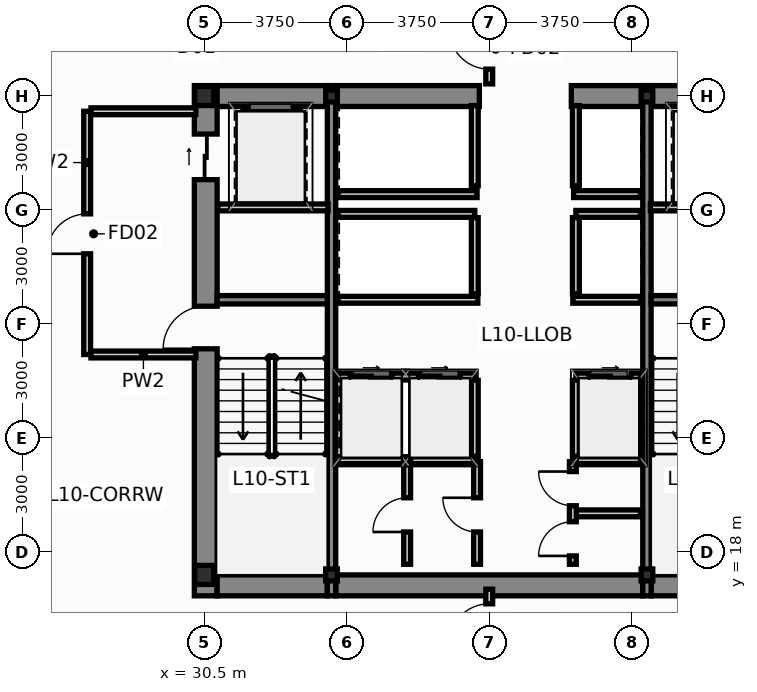
"""IFC4 building model, lengths in metres.
Left out: names, types, materials, properties, quantities, classifications, styles, units other than length and angle.
Written with IfcOpenShell. Run it as: python <this file> out.ifc"""

import sys

from ifc_helpers import new_model, si_unit, direction, frame, frame_2d, origin, origin_2d, place, context, subcontext, project, spatial, rectangle, i_section, extrude, source, transform, mapped, element, fill, save


model = new_model("IFC4")
c1 = context("Model", 3, precision=1e-05, world=origin(), true_north=direction((0.0, 1.0)))
c2 = subcontext(c1, "Body", "Model", "MODEL_VIEW")
j1 = project(units=[si_unit("LENGTHUNIT", "METRE"), si_unit("PLANEANGLEUNIT", "RADIAN")], contexts=[c1])
p1 = place(None, origin())
s1 = spatial("IfcSite", under=j1, at=p1, CompositionType="ELEMENT")
p2 = place(p1, origin())
s2 = spatial("IfcBuilding", under=s1, at=p2, CompositionType="ELEMENT")
p3 = place(p2, frame((0.0, 0.0, 42.2)))
s3 = spatial("IfcBuildingStorey", under=s2, at=p3, CompositionType="ELEMENT", Elevation=42.2)
m1 = source(origin(), c2, "Body", "SweptSolid", [
    extrude(i_section(OverallWidth=0.5, OverallDepth=0.5, WebThickness=0.028, FlangeThickness=0.04, at=origin_2d()), origin(), (0.0, 0.0, 1.0), 3.65),
])
for number, where, z_axis, x_axis in (
    (1, (30.5, 17.4, 0.0), (0.0, 0.0, 1.0), (1.0, 0.0, 0.0)),
    (2, (30.5, 30.0, 0.0), (0.0, 0.0, 1.0), (1.0, 0.0, 0.0)),
):
    element("IfcColumn", number, at=place(p3, frame(where, z_axis=z_axis, x_axis=x_axis)), inside=s3, PredefinedType="COLUMN", context=c2, shape_type="MappedRepresentation", body=[
        mapped(m1, transform((0.0, 0.0, 0.0), scale=1.0)),
    ])
m2 = source(origin(), c2, "Body", "SweptSolid", [
    extrude(i_section(OverallWidth=0.307, OverallDepth=0.315, WebThickness=0.012, FlangeThickness=0.019, at=origin_2d()), origin(), (0.0, 0.0, 1.0), 3.65),
])
for number, where, z_axis, x_axis in (
    (3, (33.85, 17.4, 0.0), (0.0, 0.0, 1.0), (1.0, 0.0, 0.0)),
    (4, (42.15, 17.4, 0.0), (0.0, 0.0, 1.0), (1.0, 0.0, 0.0)),
    (5, (33.85, 30.0, 0.0), (0.0, 0.0, 1.0), (1.0, 0.0, 0.0)),
    (6, (42.15, 30.0, 0.0), (0.0, 0.0, 1.0), (1.0, 0.0, 0.0)),
):
    element("IfcColumn", number, at=place(p3, frame(where, z_axis=z_axis, x_axis=x_axis)), inside=s3, PredefinedType="COLUMN", context=c2, shape_type="MappedRepresentation", body=[
        mapped(m2, transform((0.0, 0.0, 0.0), scale=1.0)),
    ])
p4 = place(p3, frame((30.54, 16.85, 0.0), z_axis=(0.0, 0.0, 1.0), x_axis=(0.0, 1.0, 0.0)))
e7 = element("IfcWall", 7, at=p4, inside=s3, PredefinedType="SHEAR", context=c2, shape_type="SweptSolid", body=[
    extrude(rectangle(XDim=13.425, YDim=0.6, at=frame_2d((6.712, 0.0))), origin(), (0.0, 0.0, 1.0), 3.65),
])
p5 = place(p4, frame((6.5, 0.0, 0.0)))
e8 = element("IfcOpeningElement", 8, at=p5, cuts=e7, PredefinedType="OPENING", context=c2, shape_type="SweptSolid", body=[
    extrude(rectangle(XDim=1.12, YDim=2.15, at=frame_2d((0.56, 1.075))), frame((0.0, 0.312, 0.0), z_axis=(0.0, -1.0, 0.0), x_axis=(1.0, 0.0, 0.0)), (0.0, 0.0, 1.0), 0.624),
])
p6 = place(p4, frame((10.95, 0.0, 0.0)))
e9 = element("IfcOpeningElement", 9, at=p6, cuts=e7, PredefinedType="OPENING", context=c2, shape_type="SweptSolid", body=[
    extrude(rectangle(XDim=1.2, YDim=2.2, at=frame_2d((0.6, 1.1))), frame((0.0, 0.312, 0.0), z_axis=(0.0, -1.0, 0.0), x_axis=(1.0, 0.0, 0.0)), (0.0, 0.0, 1.0), 0.624),
])
p7 = place(p3, frame((30.84, 17.125, 0.0), z_axis=(0.0, 0.0, 1.0), x_axis=(1.0, 0.0, 0.0)))
e10 = element("IfcWall", 10, at=p7, inside=s3, PredefinedType="SHEAR", context=c2, shape_type="SweptSolid", body=[
    extrude(rectangle(XDim=2.9, YDim=0.55, at=frame_2d((1.45, 0.0))), origin(), (0.0, 0.0, 1.0), 3.65),
])
p8 = place(p3, frame((33.96, 17.125, 0.0), z_axis=(0.0, 0.0, 1.0), x_axis=(1.0, 0.0, 0.0)))
e11 = element("IfcWall", 11, at=p8, inside=s3, PredefinedType="SHEAR", context=c2, shape_type="SweptSolid", body=[
    extrude(rectangle(XDim=8.08, YDim=0.55, at=frame_2d((4.04, 0.0))), origin(), (0.0, 0.0, 1.0), 3.65),
])
for number, where, z_axis, x_axis in (
    (12, (42.26, 17.125, 0.0), (0.0, 0.0, 1.0), (1.0, 0.0, 0.0)),
    (13, (30.84, 30.0, 0.0), (0.0, 0.0, 1.0), (1.0, 0.0, 0.0)),
):
    element("IfcWall", number, at=place(p3, frame(where, z_axis=z_axis, x_axis=x_axis)), inside=s3, PredefinedType="SHEAR", context=c2, shape_type="SweptSolid", body=[
        extrude(rectangle(XDim=2.9, YDim=0.55, at=frame_2d((1.45, 0.0))), origin(), (0.0, 0.0, 1.0), 3.65),
    ])
p9 = place(p3, frame((33.96, 30.0, 0.0), z_axis=(0.0, 0.0, 1.0), x_axis=(1.0, 0.0, 0.0)))
e14 = element("IfcWall", 14, at=p9, inside=s3, PredefinedType="SHEAR", context=c2, shape_type="SweptSolid", body=[
    extrude(rectangle(XDim=3.78, YDim=0.55, at=frame_2d((1.89, 0.0))), origin(), (0.0, 0.0, 1.0), 3.65),
])
p10 = place(p3, frame((40.16, 30.0, 0.0), z_axis=(0.0, 0.0, 1.0), x_axis=(1.0, 0.0, 0.0)))
e15 = element("IfcWall", 15, at=p10, inside=s3, PredefinedType="SHEAR", context=c2, shape_type="SweptSolid", body=[
    extrude(rectangle(XDim=1.88, YDim=0.55, at=frame_2d((0.94, 0.0))), origin(), (0.0, 0.0, 1.0), 3.65),
])
p11 = place(p3, frame((42.26, 30.0, 0.0), z_axis=(0.0, 0.0, 1.0), x_axis=(1.0, 0.0, 0.0)))
e16 = element("IfcWall", 16, at=p11, inside=s3, PredefinedType="SHEAR", context=c2, shape_type="SweptSolid", body=[
    extrude(rectangle(XDim=2.9, YDim=0.55, at=frame_2d((1.45, 0.0))), origin(), (0.0, 0.0, 1.0), 3.65),
])
for number, where, z_axis, x_axis in (
    (17, (33.85, 16.85, 0.0), (0.0, 0.0, 1.0), (0.0, 1.0, 0.0)),
    (18, (42.15, 16.85, 0.0), (0.0, 0.0, 1.0), (0.0, 1.0, 0.0)),
):
    element("IfcWall", number, at=place(p3, frame(where, z_axis=z_axis, x_axis=x_axis)), inside=s3, PredefinedType="SHEAR", context=c2, shape_type="SweptSolid", body=[
        extrude(rectangle(XDim=13.425, YDim=0.22, at=frame_2d((6.712, 0.0))), origin(), (0.0, 0.0, 1.0), 3.65),
    ])
for number, where, z_axis, x_axis in (
    (19, (30.84, 24.64, 0.0), (0.0, 0.0, 1.0), (1.0, 0.0, 0.0)),
    (20, (42.26, 24.64, 0.0), (0.0, 0.0, 1.0), (1.0, 0.0, 0.0)),
):
    element("IfcWall", number, at=place(p3, frame(where, z_axis=z_axis, x_axis=x_axis)), inside=s3, PredefinedType="SHEAR", context=c2, shape_type="SweptSolid", body=[
        extrude(rectangle(XDim=2.9, YDim=0.22, at=frame_2d((1.45, 0.0))), origin(), (0.0, 0.0, 1.0), 3.65),
    ])
p12 = place(p3, frame((34.02, 22.62, 0.0), z_axis=(0.0, 0.0, 1.0), x_axis=(1.0, 0.0, 0.0)))
e21 = element("IfcWall", 21, at=p12, inside=s3, PredefinedType="PARTITIONING", context=c2, shape_type="SweptSolid", body=[
    extrude(rectangle(XDim=3.6, YDim=0.18, at=frame_2d((1.8, 0.0))), origin(), (0.0, 0.0, 1.0), 3.4),
])
p13 = place(p12, frame((0.32, 0.0, 0.0)))
e22 = element("IfcOpeningElement", 22, at=p13, cuts=e21, PredefinedType="OPENING", context=c2, shape_type="SweptSolid", body=[
    extrude(rectangle(XDim=1.1, YDim=2.2, at=frame_2d((0.55, 1.1))), frame((0.0, 0.102, 0.0), z_axis=(0.0, -1.0, 0.0), x_axis=(1.0, 0.0, 0.0)), (0.0, 0.0, 1.0), 0.204),
])
p14 = place(p12, frame((2.12, 0.0, 0.0)))
e23 = element("IfcOpeningElement", 23, at=p14, cuts=e21, PredefinedType="OPENING", context=c2, shape_type="SweptSolid", body=[
    extrude(rectangle(XDim=1.1, YDim=2.2, at=frame_2d((0.55, 1.1))), frame((0.0, 0.102, 0.0), z_axis=(0.0, -1.0, 0.0), x_axis=(1.0, 0.0, 0.0)), (0.0, 0.0, 1.0), 0.204),
])
p15 = place(p3, frame((40.28, 22.62, 0.0), z_axis=(0.0, 0.0, 1.0), x_axis=(1.0, 0.0, 0.0)))
e24 = element("IfcWall", 24, at=p15, inside=s3, PredefinedType="PARTITIONING", context=c2, shape_type="SweptSolid", body=[
    extrude(rectangle(XDim=1.7, YDim=0.18, at=frame_2d((0.85, 0.0))), origin(), (0.0, 0.0, 1.0), 3.4),
])
p16 = place(p15, frame((0.35, 0.0, 0.0)))
e25 = element("IfcOpeningElement", 25, at=p16, cuts=e24, PredefinedType="OPENING", context=c2, shape_type="SweptSolid", body=[
    extrude(rectangle(XDim=1.1, YDim=2.2, at=frame_2d((0.55, 1.1))), frame((0.0, 0.102, 0.0), z_axis=(0.0, -1.0, 0.0), x_axis=(1.0, 0.0, 0.0)), (0.0, 0.0, 1.0), 0.204),
])
for number, where, z_axis, x_axis in (
    (26, (37.62, 20.52, 0.0), (0.0, 0.0, 1.0), (0.0, 1.0, 0.0)),
    (27, (40.28, 20.52, 0.0), (0.0, 0.0, 1.0), (0.0, 1.0, 0.0)),
):
    element("IfcWall", number, at=place(p3, frame(where, z_axis=z_axis, x_axis=x_axis)), inside=s3, PredefinedType="PARTITIONING", context=c2, shape_type="SweptSolid", body=[
        extrude(rectangle(XDim=2.0, YDim=0.18, at=frame_2d((1.0, 0.0))), origin(), (0.0, 0.0, 1.0), 3.4),
    ])
p17 = place(p3, frame((34.02, 26.9, 0.0), z_axis=(0.0, 0.0, 1.0), x_axis=(1.0, 0.0, 0.0)))
e28 = element("IfcWall", 28, at=p17, inside=s3, PredefinedType="PARTITIONING", context=c2, shape_type="SweptSolid", body=[
    extrude(rectangle(XDim=3.6, YDim=0.18, at=frame_2d((1.8, 0.0))), origin(), (0.0, 0.0, 1.0), 3.4),
])
p18 = place(p3, frame((40.28, 26.9, 0.0), z_axis=(0.0, 0.0, 1.0), x_axis=(1.0, 0.0, 0.0)))
e29 = element("IfcWall", 29, at=p18, inside=s3, PredefinedType="PARTITIONING", context=c2, shape_type="SweptSolid", body=[
    extrude(rectangle(XDim=1.7, YDim=0.18, at=frame_2d((0.85, 0.0))), origin(), (0.0, 0.0, 1.0), 3.4),
])
for number, where, z_axis, x_axis in (
    (30, (37.62, 24.8, 0.0), (0.0, 0.0, 1.0), (0.0, 1.0, 0.0)),
    (31, (40.28, 24.8, 0.0), (0.0, 0.0, 1.0), (0.0, 1.0, 0.0)),
):
    element("IfcWall", number, at=place(p3, frame(where, z_axis=z_axis, x_axis=x_axis)), inside=s3, PredefinedType="PARTITIONING", context=c2, shape_type="SweptSolid", body=[
        extrude(rectangle(XDim=2.0, YDim=0.18, at=frame_2d((1.0, 0.0))), origin(), (0.0, 0.0, 1.0), 3.4),
    ])
p19 = place(p3, frame((34.02, 24.64, 0.0), z_axis=(0.0, 0.0, 1.0), x_axis=(1.0, 0.0, 0.0)))
e32 = element("IfcWall", 32, at=p19, inside=s3, PredefinedType="PARTITIONING", context=c2, shape_type="SweptSolid", body=[
    extrude(rectangle(XDim=3.68, YDim=0.18, at=frame_2d((1.84, 0.0))), origin(), (0.0, 0.0, 1.0), 3.4),
])
p20 = place(p3, frame((40.2, 24.64, 0.0), z_axis=(0.0, 0.0, 1.0), x_axis=(1.0, 0.0, 0.0)))
e33 = element("IfcWall", 33, at=p20, inside=s3, PredefinedType="PARTITIONING", context=c2, shape_type="SweptSolid", body=[
    extrude(rectangle(XDim=1.78, YDim=0.18, at=frame_2d((0.89, 0.0))), origin(), (0.0, 0.0, 1.0), 3.4),
])
p21 = place(p3, frame((34.02, 27.42, 0.0), z_axis=(0.0, 0.0, 1.0), x_axis=(1.0, 0.0, 0.0)))
e34 = element("IfcWall", 34, at=p21, inside=s3, PredefinedType="PARTITIONING", context=c2, shape_type="SweptSolid", body=[
    extrude(rectangle(XDim=3.66, YDim=0.18, at=frame_2d((1.83, 0.0))), origin(), (0.0, 0.0, 1.0), 3.4),
])
p22 = place(p3, frame((40.22, 27.42, 0.0), z_axis=(0.0, 0.0, 1.0), x_axis=(1.0, 0.0, 0.0)))
e35 = element("IfcWall", 35, at=p22, inside=s3, PredefinedType="PARTITIONING", context=c2, shape_type="SweptSolid", body=[
    extrude(rectangle(XDim=1.76, YDim=0.18, at=frame_2d((0.88, 0.0))), origin(), (0.0, 0.0, 1.0), 3.4),
])
for number, where, z_axis, x_axis in (
    (36, (37.62, 27.64, 0.0), (0.0, 0.0, 1.0), (0.0, 1.0, 0.0)),
    (37, (40.28, 27.64, 0.0), (0.0, 0.0, 1.0), (0.0, 1.0, 0.0)),
):
    element("IfcWall", number, at=place(p3, frame(where, z_axis=z_axis, x_axis=x_axis)), inside=s3, PredefinedType="PARTITIONING", context=c2, shape_type="SweptSolid", body=[
        extrude(rectangle(XDim=2.11, YDim=0.18, at=frame_2d((1.055, 0.0))), origin(), (0.0, 0.0, 1.0), 3.4),
    ])
p23 = place(p3, frame((27.42, 23.2, 0.0), z_axis=(0.0, 0.0, 1.0), x_axis=(0.0, 1.0, 0.0)))
e38 = element("IfcWall", 38, at=p23, inside=s3, PredefinedType="PARTITIONING", context=c2, shape_type="SweptSolid", body=[
    extrude(rectangle(XDim=6.4, YDim=0.18, at=frame_2d((3.2, 0.0))), origin(), (0.0, 0.0, 1.0), 3.4),
])
p24 = place(p23, frame((2.65, 0.0, 0.0)))
e39 = element("IfcOpeningElement", 39, at=p24, cuts=e38, PredefinedType="OPENING", context=c2, shape_type="SweptSolid", body=[
    extrude(rectangle(XDim=1.05, YDim=2.15, at=frame_2d((0.525, 1.075))), frame((0.0, 0.102, 0.0), z_axis=(0.0, -1.0, 0.0), x_axis=(1.0, 0.0, 0.0)), (0.0, 0.0, 1.0), 0.204),
])
p25 = place(p3, frame((27.52, 23.2, 0.0), z_axis=(0.0, 0.0, 1.0), x_axis=(1.0, 0.0, 0.0)))
e40 = element("IfcWall", 40, at=p25, inside=s3, PredefinedType="PARTITIONING", context=c2, shape_type="SweptSolid", body=[
    extrude(rectangle(XDim=2.76, YDim=0.18, at=frame_2d((1.38, 0.0))), origin(), (0.0, 0.0, 1.0), 3.4),
])
p26 = place(p3, frame((27.52, 29.6, 0.0), z_axis=(0.0, 0.0, 1.0), x_axis=(1.0, 0.0, 0.0)))
e41 = element("IfcWall", 41, at=p26, inside=s3, PredefinedType="PARTITIONING", context=c2, shape_type="SweptSolid", body=[
    extrude(rectangle(XDim=2.76, YDim=0.18, at=frame_2d((1.38, 0.0))), origin(), (0.0, 0.0, 1.0), 2.783),
])
for number, where, z_axis, x_axis in (
    (42, (30.86, 27.07, 0.0), (0.0, 0.0, 1.0), (1.0, 0.0, 0.0)),
    (43, (42.24, 27.07, 0.0), (0.0, 0.0, 1.0), (1.0, 0.0, 0.0)),
):
    element("IfcWall", number, at=place(p3, frame(where, z_axis=z_axis, x_axis=x_axis)), inside=s3, PredefinedType="PARTITIONING", context=c2, shape_type="SweptSolid", body=[
        extrude(rectangle(XDim=2.9, YDim=0.18, at=frame_2d((1.45, 0.0))), origin(), (0.0, 0.0, 1.0), 3.4),
    ])
p27 = place(p3, frame((34.02, 20.42, 0.0), z_axis=(0.0, 0.0, 1.0), x_axis=(1.0, 0.0, 0.0)))
e44 = element("IfcWall", 44, at=p27, inside=s3, PredefinedType="PARTITIONING", context=c2, shape_type="SweptSolid", body=[
    extrude(rectangle(XDim=3.64, YDim=0.18, at=frame_2d((1.82, 0.0))), origin(), (0.0, 0.0, 1.0), 3.4),
])
p28 = place(p3, frame((40.22, 20.42, 0.0), z_axis=(0.0, 0.0, 1.0), x_axis=(1.0, 0.0, 0.0)))
e45 = element("IfcWall", 45, at=p28, inside=s3, PredefinedType="PARTITIONING", context=c2, shape_type="SweptSolid", body=[
    extrude(rectangle(XDim=1.76, YDim=0.18, at=frame_2d((0.88, 0.0))), origin(), (0.0, 0.0, 1.0), 3.4),
])
p29 = place(p3, frame((35.84, 17.68, 0.0), z_axis=(0.0, 0.0, 1.0), x_axis=(0.0, 1.0, 0.0)))
e46 = element("IfcWall", 46, at=p29, inside=s3, PredefinedType="PARTITIONING", context=c2, shape_type="SweptSolid", body=[
    extrude(rectangle(XDim=2.7, YDim=0.18, at=frame_2d((1.35, 0.0))), origin(), (0.0, 0.0, 1.0), 3.4),
])
p30 = place(p29, frame((0.85, 0.0, 0.0)))
e47 = element("IfcOpeningElement", 47, at=p30, cuts=e46, PredefinedType="OPENING", context=c2, shape_type="SweptSolid", body=[
    extrude(rectangle(XDim=0.9, YDim=2.1, at=frame_2d((0.45, 1.05))), frame((0.0, 0.102, 0.0), z_axis=(0.0, -1.0, 0.0), x_axis=(1.0, 0.0, 0.0)), (0.0, 0.0, 1.0), 0.204),
])
p31 = place(p3, frame((37.68, 17.68, 0.0), z_axis=(0.0, 0.0, 1.0), x_axis=(0.0, 1.0, 0.0)))
e48 = element("IfcWall", 48, at=p31, inside=s3, PredefinedType="PARTITIONING", context=c2, shape_type="SweptSolid", body=[
    extrude(rectangle(XDim=2.7, YDim=0.18, at=frame_2d((1.35, 0.0))), origin(), (0.0, 0.0, 1.0), 3.4),
])
p32 = place(p31, frame((0.85, 0.0, 0.0)))
e49 = element("IfcOpeningElement", 49, at=p32, cuts=e48, PredefinedType="OPENING", context=c2, shape_type="SweptSolid", body=[
    extrude(rectangle(XDim=0.9, YDim=2.1, at=frame_2d((0.45, 1.05))), frame((0.0, 0.102, 0.0), z_axis=(0.0, -1.0, 0.0), x_axis=(1.0, 0.0, 0.0)), (0.0, 0.0, 1.0), 0.204),
])
p33 = place(p3, frame((40.28, 19.02, 0.0), z_axis=(0.0, 0.0, 1.0), x_axis=(1.0, 0.0, 0.0)))
e50 = element("IfcWall", 50, at=p33, inside=s3, PredefinedType="PARTITIONING", context=c2, shape_type="SweptSolid", body=[
    extrude(rectangle(XDim=1.7, YDim=0.18, at=frame_2d((0.85, 0.0))), origin(), (0.0, 0.0, 1.0), 3.4),
])
p34 = place(p3, frame((40.2, 17.68, 0.0), z_axis=(0.0, 0.0, 1.0), x_axis=(0.0, 1.0, 0.0)))
e51 = element("IfcWall", 51, at=p34, inside=s3, PredefinedType="PARTITIONING", context=c2, shape_type="SweptSolid", body=[
    extrude(rectangle(XDim=2.7, YDim=0.18, at=frame_2d((1.35, 0.0))), origin(), (0.0, 0.0, 1.0), 3.4),
])
p35 = place(p34, frame((0.22, 0.0, 0.0)))
e52 = element("IfcOpeningElement", 52, at=p35, cuts=e51, PredefinedType="OPENING", context=c2, shape_type="SweptSolid", body=[
    extrude(rectangle(XDim=0.9, YDim=2.1, at=frame_2d((0.45, 1.05))), frame((0.0, 0.102, 0.0), z_axis=(0.0, -1.0, 0.0), x_axis=(1.0, 0.0, 0.0)), (0.0, 0.0, 1.0), 0.204),
])
p36 = place(p34, frame((1.54, 0.0, 0.0)))
e53 = element("IfcOpeningElement", 53, at=p36, cuts=e51, PredefinedType="OPENING", context=c2, shape_type="SweptSolid", body=[
    extrude(rectangle(XDim=0.9, YDim=2.1, at=frame_2d((0.45, 1.05))), frame((0.0, 0.102, 0.0), z_axis=(0.0, -1.0, 0.0), x_axis=(1.0, 0.0, 0.0)), (0.0, 0.0, 1.0), 0.204),
])
p37 = place(p3, frame((38.0, 15.205, 0.0), z_axis=(0.0, 0.0, 1.0), x_axis=(0.0, 1.0, 0.0)))
e54 = element("IfcWall", 54, at=p37, inside=s3, PredefinedType="PARTITIONING", context=c2, shape_type="SweptSolid", body=[
    extrude(rectangle(XDim=1.82, YDim=0.18, at=frame_2d((0.91, 0.0))), origin(), (0.0, 0.0, 1.0), 3.4),
])
p38 = place(p37, frame((0.385, 0.0, 0.0)))
e55 = element("IfcOpeningElement", 55, at=p38, cuts=e54, PredefinedType="OPENING", context=c2, shape_type="SweptSolid", body=[
    extrude(rectangle(XDim=1.05, YDim=2.15, at=frame_2d((0.525, 1.075))), frame((0.0, 0.102, 0.0), z_axis=(0.0, -1.0, 0.0), x_axis=(1.0, 0.0, 0.0)), (0.0, 0.0, 1.0), 0.204),
])
p39 = place(p3, frame((38.0, 30.32, 0.0), z_axis=(0.0, 0.0, 1.0), x_axis=(0.0, 1.0, 0.0)))
e56 = element("IfcWall", 56, at=p39, inside=s3, PredefinedType="PARTITIONING", context=c2, shape_type="SweptSolid", body=[
    extrude(rectangle(XDim=1.825, YDim=0.18, at=frame_2d((0.913, 0.0))), origin(), (0.0, 0.0, 1.0), 3.4),
])
p40 = place(p39, frame((0.388, 0.0, 0.0)))
e57 = element("IfcOpeningElement", 57, at=p40, cuts=e56, PredefinedType="OPENING", context=c2, shape_type="SweptSolid", body=[
    extrude(rectangle(XDim=1.05, YDim=2.15, at=frame_2d((0.525, 1.075))), frame((0.0, 0.102, 0.0), z_axis=(0.0, -1.0, 0.0), x_axis=(1.0, 0.0, 0.0)), (0.0, 0.0, 1.0), 0.204),
])
p41 = place(p5, origin())
e58 = element("IfcDoor", 58, at=p41, inside=s3, OperationType="SINGLE_SWING_LEFT", PredefinedType="DOOR", context=c2, shape_type="SweptSolid", body=[
    extrude(rectangle(XDim=1.12, YDim=2.15, at=frame_2d((0.56, 1.075))), frame((0.0, 0.025, 0.0), z_axis=(0.0, -1.0, 0.0), x_axis=(1.0, 0.0, 0.0)), (0.0, 0.0, 1.0), 0.05),
])
fill(e8, e58)
p42 = place(p6, origin())
e59 = element("IfcDoor", 59, at=p42, inside=s3, OperationType="SLIDING_TO_LEFT", PredefinedType="DOOR", context=c2, shape_type="SweptSolid", body=[
    extrude(rectangle(XDim=1.2, YDim=2.2, at=frame_2d((0.6, 1.1))), frame((0.0, 0.025, 0.0), z_axis=(0.0, -1.0, 0.0), x_axis=(1.0, 0.0, 0.0)), (0.0, 0.0, 1.0), 0.05),
])
fill(e9, e59)
p43 = place(p13, origin())
e60 = element("IfcDoor", 60, at=p43, inside=s3, OperationType="SLIDING_TO_LEFT", PredefinedType="DOOR", context=c2, shape_type="SweptSolid", body=[
    extrude(rectangle(XDim=1.1, YDim=2.2, at=frame_2d((0.55, 1.1))), frame((0.0, 0.025, 0.0), z_axis=(0.0, -1.0, 0.0), x_axis=(1.0, 0.0, 0.0)), (0.0, 0.0, 1.0), 0.05),
])
fill(e22, e60)
p44 = place(p14, origin())
e61 = element("IfcDoor", 61, at=p44, inside=s3, OperationType="SLIDING_TO_RIGHT", PredefinedType="DOOR", context=c2, shape_type="SweptSolid", body=[
    extrude(rectangle(XDim=1.1, YDim=2.2, at=frame_2d((0.55, 1.1))), frame((0.0, 0.025, 0.0), z_axis=(0.0, -1.0, 0.0), x_axis=(1.0, 0.0, 0.0)), (0.0, 0.0, 1.0), 0.05),
])
fill(e23, e61)
p45 = place(p16, origin())
e62 = element("IfcDoor", 62, at=p45, inside=s3, OperationType="SLIDING_TO_LEFT", PredefinedType="DOOR", context=c2, shape_type="SweptSolid", body=[
    extrude(rectangle(XDim=1.1, YDim=2.2, at=frame_2d((0.55, 1.1))), frame((0.0, 0.025, 0.0), z_axis=(0.0, -1.0, 0.0), x_axis=(1.0, 0.0, 0.0)), (0.0, 0.0, 1.0), 0.05),
])
fill(e25, e62)
p46 = place(p24, origin())
e63 = element("IfcDoor", 63, at=p46, inside=s3, OperationType="SINGLE_SWING_LEFT", PredefinedType="DOOR", context=c2, shape_type="SweptSolid", body=[
    extrude(rectangle(XDim=1.05, YDim=2.15, at=frame_2d((0.525, 1.075))), frame((0.0, 0.025, 0.0), z_axis=(0.0, -1.0, 0.0), x_axis=(1.0, 0.0, 0.0)), (0.0, 0.0, 1.0), 0.05),
])
fill(e39, e63)
p47 = place(p30, origin())
e64 = element("IfcDoor", 64, at=p47, inside=s3, OperationType="SINGLE_SWING_LEFT", PredefinedType="DOOR", context=c2, shape_type="SweptSolid", body=[
    extrude(rectangle(XDim=0.9, YDim=2.1, at=frame_2d((0.45, 1.05))), frame((0.0, 0.025, 0.0), z_axis=(0.0, -1.0, 0.0), x_axis=(1.0, 0.0, 0.0)), (0.0, 0.0, 1.0), 0.05),
])
fill(e47, e64)
p48 = place(p32, origin())
e65 = element("IfcDoor", 65, at=p48, inside=s3, OperationType="SINGLE_SWING_RIGHT", PredefinedType="DOOR", context=c2, shape_type="SweptSolid", body=[
    extrude(rectangle(XDim=0.9, YDim=2.1, at=frame_2d((0.45, 1.05))), frame((0.0, 0.025, 0.0), z_axis=(0.0, -1.0, 0.0), x_axis=(1.0, 0.0, 0.0)), (0.0, 0.0, 1.0), 0.05),
])
fill(e49, e65)
p49 = place(p35, origin())
e66 = element("IfcDoor", 66, at=p49, inside=s3, OperationType="SINGLE_SWING_LEFT", PredefinedType="DOOR", context=c2, shape_type="SweptSolid", body=[
    extrude(rectangle(XDim=0.9, YDim=2.1, at=frame_2d((0.45, 1.05))), frame((0.0, 0.025, 0.0), z_axis=(0.0, -1.0, 0.0), x_axis=(1.0, 0.0, 0.0)), (0.0, 0.0, 1.0), 0.05),
])
fill(e52, e66)
p50 = place(p36, origin())
e67 = element("IfcDoor", 67, at=p50, inside=s3, OperationType="SINGLE_SWING_RIGHT", PredefinedType="DOOR", context=c2, shape_type="SweptSolid", body=[
    extrude(rectangle(XDim=0.9, YDim=2.1, at=frame_2d((0.45, 1.05))), frame((0.0, 0.025, 0.0), z_axis=(0.0, -1.0, 0.0), x_axis=(1.0, 0.0, 0.0)), (0.0, 0.0, 1.0), 0.05),
])
fill(e53, e67)
p51 = place(p38, origin())
e68 = element("IfcDoor", 68, at=p51, inside=s3, OperationType="SINGLE_SWING_LEFT", PredefinedType="DOOR", context=c2, shape_type="SweptSolid", body=[
    extrude(rectangle(XDim=1.05, YDim=2.15, at=frame_2d((0.525, 1.075))), frame((0.0, 0.025, 0.0), z_axis=(0.0, -1.0, 0.0), x_axis=(1.0, 0.0, 0.0)), (0.0, 0.0, 1.0), 0.05),
])
fill(e55, e68)
p52 = place(p40, origin())
e69 = element("IfcDoor", 69, at=p52, inside=s3, OperationType="SINGLE_SWING_RIGHT", PredefinedType="DOOR", context=c2, shape_type="SweptSolid", body=[
    extrude(rectangle(XDim=1.05, YDim=2.15, at=frame_2d((0.525, 1.075))), frame((0.0, 0.025, 0.0), z_axis=(0.0, -1.0, 0.0), x_axis=(1.0, 0.0, 0.0)), (0.0, 0.0, 1.0), 0.05),
])
fill(e57, e69)
save(model, sys.argv[1])
